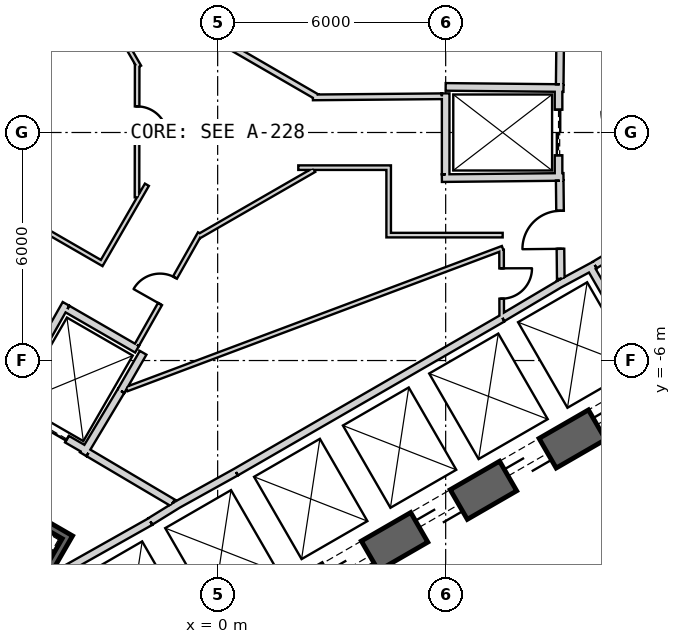
"""IFC4 building model, lengths in metres.
Left out: names, types, materials, properties, quantities, classifications, styles, units other than length and angle.
Written with IfcOpenShell. Run it as: python <this file> out.ifc"""

import sys

from ifc_helpers import new_model, si_unit, direction, frame, frame_2d, origin, place, context, subcontext, project, spatial, rectangle, extrude, element, fill, save


model = new_model("IFC4")
c1 = context("Model", 3, precision=1e-05, world=origin(), true_north=direction((0.0, 1.0)))
c2 = subcontext(c1, "Body", "Model", "MODEL_VIEW")
j1 = project(units=[si_unit("LENGTHUNIT", "METRE"), si_unit("PLANEANGLEUNIT", "RADIAN")], contexts=[c1])
p1 = place(None, origin())
s1 = spatial("IfcSite", under=j1, at=p1, CompositionType="ELEMENT")
p2 = place(p1, origin())
s2 = spatial("IfcBuilding", under=s1, at=p2, CompositionType="ELEMENT")
p3 = place(p2, frame((0.0, 0.0, 253.2)))
s3 = spatial("IfcBuildingStorey", under=s2, at=p3, CompositionType="ELEMENT", Elevation=253.2)
p4 = place(p3, frame((19.475, 2.208, 0.0), z_axis=(0.0, 0.0, 1.0), x_axis=(-0.866028369851, 0.499994862586, 0.0)))
e1 = element("IfcWall", 1, at=p4, inside=s3, PredefinedType="SHEAR", context=c2, shape_type="SweptSolid", body=[
    extrude(rectangle(XDim=31.523, YDim=0.9, at=frame_2d((15.762, 0.0))), origin(), (0.0, 0.0, 1.0), 4.0),
])
p5 = place(p4, frame((7.062, 0.0, 0.0)))
e2 = element("IfcOpeningElement", 2, at=p5, cuts=e1, PredefinedType="OPENING", context=c2, shape_type="SweptSolid", body=[
    extrude(rectangle(XDim=1.2, YDim=2.4, at=frame_2d((0.6, 1.2))), frame((0.0, 0.46, 0.0), z_axis=(0.0, -1.0, 0.0), x_axis=(1.0, 0.0, 0.0)), (0.0, 0.0, 1.0), 0.92),
])
p6 = place(p4, frame((3.612, 0.0, 0.0)))
e3 = element("IfcOpeningElement", 3, at=p6, cuts=e1, PredefinedType="OPENING", context=c2, shape_type="SweptSolid", body=[
    extrude(rectangle(XDim=1.2, YDim=2.4, at=frame_2d((0.6, 1.2))), frame((0.0, 0.46, 0.0), z_axis=(0.0, -1.0, 0.0), x_axis=(1.0, 0.0, 0.0)), (0.0, 0.0, 1.0), 0.92),
])
p7 = place(p4, frame((26.712, 0.0, 0.0)))
e4 = element("IfcOpeningElement", 4, at=p7, cuts=e1, PredefinedType="OPENING", context=c2, shape_type="SweptSolid", body=[
    extrude(rectangle(XDim=1.2, YDim=2.4, at=frame_2d((0.6, 1.2))), frame((0.0, 0.46, 0.0), z_axis=(0.0, -1.0, 0.0), x_axis=(1.0, 0.0, 0.0)), (0.0, 0.0, 1.0), 0.92),
])
p8 = place(p3, frame((-7.825, -17.97, 0.0), z_axis=(0.0, 0.0, 1.0), x_axis=(0.866028369851, 0.499994862586, 0.0)))
e5 = element("IfcWall", 5, at=p8, inside=s3, PredefinedType="SHEAR", context=c2, shape_type="SweptSolid", body=[
    extrude(rectangle(XDim=31.523, YDim=0.9, at=frame_2d((15.762, 0.0))), origin(), (0.0, 0.0, 1.0), 4.0),
])
p9 = place(p8, frame((7.062, 0.0, 0.0)))
e6 = element("IfcOpeningElement", 6, at=p9, cuts=e5, PredefinedType="OPENING", context=c2, shape_type="SweptSolid", body=[
    extrude(rectangle(XDim=1.2, YDim=2.4, at=frame_2d((0.6, 1.2))), frame((0.0, 0.46, 0.0), z_axis=(0.0, -1.0, 0.0), x_axis=(1.0, 0.0, 0.0)), (0.0, 0.0, 1.0), 0.92),
])
p10 = place(p8, frame((9.762, 0.0, 0.0)))
e7 = element("IfcOpeningElement", 7, at=p10, cuts=e5, PredefinedType="OPENING", context=c2, shape_type="SweptSolid", body=[
    extrude(rectangle(XDim=1.2, YDim=2.4, at=frame_2d((0.6, 1.2))), frame((0.0, 0.46, 0.0), z_axis=(0.0, -1.0, 0.0), x_axis=(1.0, 0.0, 0.0)), (0.0, 0.0, 1.0), 0.92),
])
p11 = place(p8, frame((12.462, 0.0, 0.0)))
e8 = element("IfcOpeningElement", 8, at=p11, cuts=e5, PredefinedType="OPENING", context=c2, shape_type="SweptSolid", body=[
    extrude(rectangle(XDim=1.2, YDim=2.4, at=frame_2d((0.6, 1.2))), frame((0.0, 0.46, 0.0), z_axis=(0.0, -1.0, 0.0), x_axis=(1.0, 0.0, 0.0)), (0.0, 0.0, 1.0), 0.92),
])
p12 = place(p8, frame((15.162, 0.0, 0.0)))
e9 = element("IfcOpeningElement", 9, at=p12, cuts=e5, PredefinedType="OPENING", context=c2, shape_type="SweptSolid", body=[
    extrude(rectangle(XDim=1.2, YDim=2.4, at=frame_2d((0.6, 1.2))), frame((0.0, 0.46, 0.0), z_axis=(0.0, -1.0, 0.0), x_axis=(1.0, 0.0, 0.0)), (0.0, 0.0, 1.0), 0.92),
])
p13 = place(p8, frame((17.862, 0.0, 0.0)))
e10 = element("IfcOpeningElement", 10, at=p13, cuts=e5, PredefinedType="OPENING", context=c2, shape_type="SweptSolid", body=[
    extrude(rectangle(XDim=1.2, YDim=2.4, at=frame_2d((0.6, 1.2))), frame((0.0, 0.46, 0.0), z_axis=(0.0, -1.0, 0.0), x_axis=(1.0, 0.0, 0.0)), (0.0, 0.0, 1.0), 0.92),
])
p14 = place(p8, frame((20.562, 0.0, 0.0)))
e11 = element("IfcOpeningElement", 11, at=p14, cuts=e5, PredefinedType="OPENING", context=c2, shape_type="SweptSolid", body=[
    extrude(rectangle(XDim=1.2, YDim=2.4, at=frame_2d((0.6, 1.2))), frame((0.0, 0.46, 0.0), z_axis=(0.0, -1.0, 0.0), x_axis=(1.0, 0.0, 0.0)), (0.0, 0.0, 1.0), 0.92),
])
p15 = place(p8, frame((26.712, 0.0, 0.0)))
e12 = element("IfcOpeningElement", 12, at=p15, cuts=e5, PredefinedType="OPENING", context=c2, shape_type="SweptSolid", body=[
    extrude(rectangle(XDim=1.2, YDim=2.4, at=frame_2d((0.6, 1.2))), frame((0.0, 0.46, 0.0), z_axis=(0.0, -1.0, 0.0), x_axis=(1.0, 0.0, 0.0)), (0.0, 0.0, 1.0), 0.92),
])
p16 = place(p8, frame((3.612, 0.0, 0.0)))
e13 = element("IfcOpeningElement", 13, at=p16, cuts=e5, PredefinedType="OPENING", context=c2, shape_type="SweptSolid", body=[
    extrude(rectangle(XDim=1.2, YDim=2.4, at=frame_2d((0.6, 1.2))), frame((0.0, 0.46, 0.0), z_axis=(0.0, -1.0, 0.0), x_axis=(1.0, 0.0, 0.0)), (0.0, 0.0, 1.0), 0.92),
])
p17 = place(p3, frame((0.483, -8.936, 0.0), z_axis=(0.0, 0.0, 1.0), x_axis=(0.866030989016, 0.499990325971, 0.0)))
e14 = element("IfcWall", 14, at=p17, inside=s3, PredefinedType="PLUMBINGWALL", context=c2, shape_type="SweptSolid", body=[
    extrude(rectangle(XDim=8.1, YDim=0.2, at=frame_2d((4.05, 0.0))), origin(), (0.0, 0.0, 1.0), 3.7),
])
p18 = place(p3, frame((9.795, -3.525, 0.0), z_axis=(0.0, 0.0, 1.0), x_axis=(0.499984717929, -0.866034226713, 0.0)))
e15 = element("IfcWall", 15, at=p18, inside=s3, PredefinedType="PLUMBINGWALL", context=c2, shape_type="SweptSolid", body=[
    extrude(rectangle(XDim=3.25, YDim=0.2, at=frame_2d((1.625, 0.0))), origin(), (0.0, 0.0, 1.0), 3.7),
])
p19 = place(p3, frame((8.974, -3.999, 0.0), z_axis=(0.0, 0.0, 1.0), x_axis=(0.880907015104, 0.473289373154, 0.0)))
e16 = element("IfcWall", 16, at=p19, inside=s3, PredefinedType="PLUMBINGWALL", context=c2, shape_type="SweptSolid", body=[
    extrude(rectangle(XDim=1.078, YDim=0.2, at=frame_2d((0.539, 0.0))), origin(), (0.0, 0.0, 1.0), 3.7),
])
p20 = place(p3, frame((7.493, -4.878, 0.0), z_axis=(0.0, 0.0, 1.0), x_axis=(0.859981807212, 0.510324691999, 0.0)))
e17 = element("IfcWall", 17, at=p20, inside=s3, PredefinedType="PLUMBINGWALL", context=c2, shape_type="SweptSolid", body=[
    extrude(rectangle(XDim=1.845, YDim=0.2, at=frame_2d((0.922, 0.0))), origin(), (0.0, 0.0, 1.0), 3.7),
])
p21 = place(p3, frame((-1.769, -10.237, 0.0), z_axis=(0.0, 0.0, 1.0), x_axis=(-0.871534483978, -0.490334215854, 0.0)))
e18 = element("IfcWall", 18, at=p21, inside=s3, PredefinedType="PLUMBINGWALL", context=c2, shape_type="SweptSolid", body=[
    extrude(rectangle(XDim=2.7, YDim=0.2, at=frame_2d((1.35, 0.0))), origin(), (0.0, 0.0, 1.0), 3.7),
])
p22 = place(p3, frame((-1.024, -9.771, 0.0), z_axis=(0.0, 0.0, 1.0), x_axis=(-0.850348075135, -0.526220629693, 0.0)))
e19 = element("IfcWall", 19, at=p22, inside=s3, PredefinedType="PLUMBINGWALL", context=c2, shape_type="SweptSolid", body=[
    extrude(rectangle(XDim=0.878, YDim=0.2, at=frame_2d((0.439, 0.0))), origin(), (0.0, 0.0, 1.0), 3.7),
])
p23 = place(p3, frame((-1.13, -9.831, 0.0), z_axis=(0.0, 0.0, 1.0), x_axis=(0.874269620932, 0.485440655401, 0.0)))
e20 = element("IfcWall", 20, at=p23, inside=s3, PredefinedType="PLUMBINGWALL", context=c2, shape_type="SweptSolid", body=[
    extrude(rectangle(XDim=1.845, YDim=0.2, at=frame_2d((0.922, 0.0))), origin(), (0.0, 0.0, 1.0), 3.7),
])
p24 = place(p3, frame((8.97, 1.2, 0.0), z_axis=(0.0, 0.0, 1.0), x_axis=(0.0, -1.0, 0.0)))
e21 = element("IfcWall", 21, at=p24, inside=s3, PredefinedType="PLUMBINGWALL", context=c2, shape_type="SweptSolid", body=[
    extrude(rectangle(XDim=2.4, YDim=0.2, at=frame_2d((1.2, 0.0))), origin(), (0.0, 0.0, 1.0), 3.7),
])
p25 = place(p24, frame((0.6, 0.0, 0.0)))
e22 = element("IfcOpeningElement", 22, at=p25, cuts=e21, PredefinedType="OPENING", context=c2, shape_type="SweptSolid", body=[
    extrude(rectangle(XDim=1.2, YDim=2.4, at=frame_2d((0.6, 1.2))), frame((0.0, 0.11, 0.0), z_axis=(0.0, -1.0, 0.0), x_axis=(1.0, 0.0, 0.0)), (0.0, 0.0, 1.0), 0.22),
])
p26 = place(p3, frame((6.0, 1.2, 0.0), z_axis=(0.0, 0.0, 1.0), x_axis=(0.999949988, -0.010001074852, 0.0)))
e23 = element("IfcWall", 23, at=p26, inside=s3, PredefinedType="PLUMBINGWALL", context=c2, shape_type="SweptSolid", body=[
    extrude(rectangle(XDim=3.1, YDim=0.2, at=frame_2d((1.55, 0.0))), origin(), (0.0, 0.0, 1.0), 3.7),
])
p27 = place(p3, frame((5.9, -1.201, 0.0), z_axis=(0.0, 0.0, 1.0), x_axis=(0.999950064753, 0.009993397809, 0.0)))
e24 = element("IfcWall", 24, at=p27, inside=s3, PredefinedType="PLUMBINGWALL", context=c2, shape_type="SweptSolid", body=[
    extrude(rectangle(XDim=3.2, YDim=0.2, at=frame_2d((1.6, 0.0))), origin(), (0.0, 0.0, 1.0), 3.7),
])
p28 = place(p3, frame((6.0, -1.1, 0.0), z_axis=(0.0, 0.0, 1.0), x_axis=(0.0, 1.0, 0.0)))
e25 = element("IfcWall", 25, at=p28, inside=s3, PredefinedType="PLUMBINGWALL", context=c2, shape_type="SweptSolid", body=[
    extrude(rectangle(XDim=2.13, YDim=0.2, at=frame_2d((1.065, 0.0))), origin(), (0.0, 0.0, 1.0), 3.7),
])
p29 = place(p3, frame((-3.905, -10.563, -0.3), z_axis=(0.0, 0.0, 1.0), x_axis=(-0.500012932018, -0.866017937352, 0.0)))
e26 = element("IfcWall", 26, at=p29, inside=s3, PredefinedType="SHEAR", context=c2, shape_type="SweptSolid", body=[
    extrude(rectangle(XDim=8.1, YDim=0.2, at=frame_2d((4.05, 0.0))), origin(), (0.0, 0.0, 1.0), 4.0),
])
p30 = place(p3, frame((-4.041, -10.599, -0.3), z_axis=(0.0, 0.0, 1.0), x_axis=(-0.866047807691, 0.499961193289, 0.0)))
e27 = element("IfcWall", 27, at=p30, inside=s3, PredefinedType="SHEAR", context=c2, shape_type="SweptSolid", body=[
    extrude(rectangle(XDim=3.6, YDim=0.2, at=frame_2d((1.8, 0.0))), origin(), (0.0, 0.0, 1.0), 4.0),
])
p31 = place(p30, frame((1.25, 0.0, 0.3)))
e28 = element("IfcOpeningElement", 28, at=p31, cuts=e27, PredefinedType="OPENING", context=c2, shape_type="SweptSolid", body=[
    extrude(rectangle(XDim=1.1, YDim=2.1, at=frame_2d((0.55, 1.05))), frame((0.0, 0.11, 0.0), z_axis=(0.0, -1.0, 0.0), x_axis=(1.0, 0.0, 0.0)), (0.0, 0.0, 1.0), 0.22),
])
p32 = place(p3, frame((-3.446, -8.368, 0.0), z_axis=(0.0, 0.0, 1.0), x_axis=(-0.866024647952, 0.500001309137, 0.0)))
e29 = element("IfcWall", 29, at=p32, inside=s3, PredefinedType="PLUMBINGWALL", context=c2, shape_type="SweptSolid", body=[
    extrude(rectangle(XDim=2.4, YDim=0.2, at=frame_2d((1.2, 0.0))), origin(), (0.0, 0.0, 1.0), 3.7),
])
p33 = place(p32, frame((0.6, 0.0, 0.0)))
e30 = element("IfcOpeningElement", 30, at=p33, cuts=e29, PredefinedType="OPENING", context=c2, shape_type="SweptSolid", body=[
    extrude(rectangle(XDim=1.2, YDim=2.4, at=frame_2d((0.6, 1.2))), frame((0.0, 0.11, 0.0), z_axis=(0.0, -1.0, 0.0), x_axis=(1.0, 0.0, 0.0)), (0.0, 0.0, 1.0), 0.22),
])
p34 = place(p3, frame((-1.961, -5.796, 0.0), z_axis=(0.0, 0.0, 1.0), x_axis=(-0.500074377092, -0.865982457891, 0.0)))
e31 = element("IfcWall", 31, at=p34, inside=s3, PredefinedType="PLUMBINGWALL", context=c2, shape_type="SweptSolid", body=[
    extrude(rectangle(XDim=1.161, YDim=0.2, at=frame_2d((0.581, 0.0))), origin(), (0.0, 0.0, 1.0), 3.7),
])
p35 = place(p3, frame((-2.542, -6.801, 0.0), z_axis=(0.0, 0.0, 1.0), x_axis=(-0.51375503712, -0.857936921827, 0.0)))
e32 = element("IfcWall", 32, at=p35, inside=s3, PredefinedType="PLUMBINGWALL", context=c2, shape_type="SweptSolid", body=[
    extrude(rectangle(XDim=1.939, YDim=0.2, at=frame_2d((0.97, 0.0))), origin(), (0.0, 0.0, 1.0), 3.7),
])
p36 = place(p3, frame((-3.99, -4.509, 0.0), z_axis=(0.0, 0.0, 1.0), x_axis=(-0.491358283181, -0.870957540612, 0.0)))
e33 = element("IfcWall", 33, at=p36, inside=s3, PredefinedType="PLUMBINGWALL", context=c2, shape_type="SweptSolid", body=[
    extrude(rectangle(XDim=3.2, YDim=0.2, at=frame_2d((1.6, 0.0))), origin(), (0.0, 0.0, 1.0), 3.7),
])
p37 = place(p3, frame((-3.953, -4.646, 0.0), z_axis=(0.0, 0.0, 1.0), x_axis=(0.866060616833, -0.499939004251, 0.0)))
e34 = element("IfcWall", 34, at=p37, inside=s3, PredefinedType="PLUMBINGWALL", context=c2, shape_type="SweptSolid", body=[
    extrude(rectangle(XDim=2.115, YDim=0.2, at=frame_2d((1.057, 0.0))), origin(), (0.0, 0.0, 1.0), 3.7),
])
p38 = place(p3, frame((12.245, -2.109, 0.0), z_axis=(0.0, 0.0, 1.0), x_axis=(-0.860414880418, -0.509594185166, 0.0)))
e35 = element("IfcWall", 35, at=p38, inside=s3, PredefinedType="PARTITIONING", context=c2, shape_type="SweptSolid", body=[
    extrude(rectangle(XDim=2.7, YDim=0.2, at=frame_2d((1.35, 0.0))), origin(), (0.0, 0.0, 1.0), 3.7),
])
p39 = place(p3, frame((9.001, 1.27, 0.0), z_axis=(0.0, 0.0, 1.0), x_axis=(0.01074821465, 0.999942236273, 0.0)))
e36 = element("IfcWall", 36, at=p39, inside=s3, PredefinedType="PARTITIONING", context=c2, shape_type="SweptSolid", body=[
    extrude(rectangle(XDim=2.726, YDim=0.2, at=frame_2d((1.363, 0.0))), origin(), (0.0, 0.0, 1.0), 3.7),
])
p40 = place(p3, frame((9.029, -3.851, 0.0), z_axis=(0.0, 0.0, 1.0), x_axis=(-0.010783593937, 0.99994185536, 0.0)))
e37 = element("IfcWall", 37, at=p40, inside=s3, PredefinedType="PARTITIONING", context=c2, shape_type="SweptSolid", body=[
    extrude(rectangle(XDim=2.581, YDim=0.2, at=frame_2d((1.291, 0.0))), origin(), (0.0, 0.0, 1.0), 3.7),
])
p41 = place(p40, frame((0.791, 0.0, 0.0)))
e38 = element("IfcOpeningElement", 38, at=p41, cuts=e37, PredefinedType="OPENING", context=c2, shape_type="SweptSolid", body=[
    extrude(rectangle(XDim=1.0, YDim=2.1, at=frame_2d((0.5, 1.05))), frame((0.0, 0.11, 0.0), z_axis=(0.0, -1.0, 0.0), x_axis=(1.0, 0.0, 0.0)), (0.0, 0.0, 1.0), 0.22),
])
p42 = place(p3, frame((-3.401, -8.43, 0.0), z_axis=(0.0, 0.0, 1.0), x_axis=(0.860615607571, -0.509255118781, 0.0)))
e39 = element("IfcWall", 39, at=p42, inside=s3, PredefinedType="PARTITIONING", context=c2, shape_type="SweptSolid", body=[
    extrude(rectangle(XDim=2.581, YDim=0.2, at=frame_2d((1.29, 0.0))), origin(), (0.0, 0.0, 1.0), 3.7),
])
p43 = place(p3, frame((2.507, 0.924, 0.0), z_axis=(0.0, 0.0, 1.0), x_axis=(0.999961473465, 0.008777903278, 0.0)))
e40 = element("IfcWall", 40, at=p43, inside=s3, PredefinedType="PLUMBINGWALL", context=c2, shape_type="SweptSolid", body=[
    extrude(rectangle(XDim=3.393, YDim=0.15, at=frame_2d((1.697, 0.0))), origin(), (0.0, 0.0, 1.0), 3.7),
])
p44 = place(p3, frame((-0.385, 2.673, 0.0), z_axis=(0.0, 0.0, 1.0), x_axis=(0.865415028875, -0.501055713266, 0.0)))
e41 = element("IfcWall", 41, at=p44, inside=s3, PredefinedType="PLUMBINGWALL", context=c2, shape_type="SweptSolid", body=[
    extrude(rectangle(XDim=3.465, YDim=0.15, at=frame_2d((1.732, 0.0))), origin(), (0.0, 0.0, 1.0), 3.7),
])
p45 = place(p3, frame((7.5, -3.042, 0.0), z_axis=(0.0, 0.0, 1.0), x_axis=(-0.936345316301, -0.35108040196, 0.0)))
e42 = element("IfcWall", 42, at=p45, inside=s3, PredefinedType="PARTITIONING", context=c2, shape_type="SweptSolid", body=[
    extrude(rectangle(XDim=10.568, YDim=0.12, at=frame_2d((5.284, 0.0))), origin(), (0.0, 0.0, 1.0), 3.7),
])
p46 = place(p3, frame((-0.466, -2.655, 0.0), z_axis=(0.0, 0.0, 1.0), x_axis=(-0.49235580986, -0.870394023703, 0.0)))
e43 = element("IfcWall", 43, at=p46, inside=s3, PredefinedType="PARTITIONING", context=c2, shape_type="SweptSolid", body=[
    extrude(rectangle(XDim=3.368, YDim=0.12, at=frame_2d((1.684, 0.0))), origin(), (0.0, 0.0, 1.0), 3.7),
])
p47 = place(p46, frame((1.335, 0.0, 0.0)))
e44 = element("IfcOpeningElement", 44, at=p47, cuts=e43, PredefinedType="OPENING", context=c2, shape_type="SweptSolid", body=[
    extrude(rectangle(XDim=0.8, YDim=2.1, at=frame_2d((0.4, 1.05))), frame((0.0, 0.07, 0.0), z_axis=(0.0, -1.0, 0.0), x_axis=(1.0, 0.0, 0.0)), (0.0, 0.0, 1.0), 0.14),
])
p48 = place(p3, frame((2.539, -0.985, 0.0), z_axis=(0.0, 0.0, 1.0), x_axis=(-0.866657135765, -0.498904208268, 0.0)))
e45 = element("IfcWall", 45, at=p48, inside=s3, PredefinedType="PARTITIONING", context=c2, shape_type="SweptSolid", body=[
    extrude(rectangle(XDim=3.505, YDim=0.12, at=frame_2d((1.752, 0.0))), origin(), (0.0, 0.0, 1.0), 3.7),
])
p49 = place(p3, frame((4.56, -0.925, 0.0), z_axis=(0.0, 0.0, 1.0), x_axis=(-1.0, 0.0, 0.0)))
e46 = element("IfcWall", 46, at=p49, inside=s3, PredefinedType="PARTITIONING", context=c2, shape_type="SweptSolid", body=[
    extrude(rectangle(XDim=2.438, YDim=0.12, at=frame_2d((1.219, 0.0))), origin(), (0.0, 0.0, 1.0), 3.7),
])
p50 = place(p3, frame((4.5, -2.76, 0.0), z_axis=(0.0, 0.0, 1.0), x_axis=(0.0, 1.0, 0.0)))
e47 = element("IfcWall", 47, at=p50, inside=s3, PredefinedType="PARTITIONING", context=c2, shape_type="SweptSolid", body=[
    extrude(rectangle(XDim=1.775, YDim=0.12, at=frame_2d((0.887, 0.0))), origin(), (0.0, 0.0, 1.0), 3.7),
])
p51 = place(p3, frame((7.5, -2.7, 0.0), z_axis=(0.0, 0.0, 1.0), x_axis=(-1.0, 0.0, 0.0)))
e48 = element("IfcWall", 48, at=p51, inside=s3, PredefinedType="PARTITIONING", context=c2, shape_type="SweptSolid", body=[
    extrude(rectangle(XDim=2.94, YDim=0.12, at=frame_2d((1.47, 0.0))), origin(), (0.0, 0.0, 1.0), 3.7),
])
p52 = place(p3, frame((7.475, -4.865, 0.0), z_axis=(0.0, 0.0, 1.0), x_axis=(-0.002330037535, 0.999997285459, 0.0)))
e49 = element("IfcWall", 49, at=p52, inside=s3, PredefinedType="PARTITIONING", context=c2, shape_type="SweptSolid", body=[
    extrude(rectangle(XDim=1.781, YDim=0.12, at=frame_2d((0.891, 0.0))), origin(), (0.0, 0.0, 1.0), 3.7),
])
p53 = place(p52, frame((0.49, 0.0, 0.0)))
e50 = element("IfcOpeningElement", 50, at=p53, cuts=e49, PredefinedType="OPENING", context=c2, shape_type="SweptSolid", body=[
    extrude(rectangle(XDim=0.8, YDim=2.1, at=frame_2d((0.4, 1.05))), frame((0.0, 0.07, 0.0), z_axis=(0.0, -1.0, 0.0), x_axis=(1.0, 0.0, 0.0)), (0.0, 0.0, 1.0), 0.14),
])
p54 = place(p3, frame((-2.066, 1.729, 0.0), z_axis=(0.0, 0.0, 1.0), x_axis=(-0.500002807145, 0.866023783073, 0.0)))
e51 = element("IfcWall", 51, at=p54, inside=s3, PredefinedType="PARTITIONING", context=c2, shape_type="SweptSolid", body=[
    extrude(rectangle(XDim=1.91, YDim=0.12, at=frame_2d((0.955, 0.0))), origin(), (0.0, 0.0, 1.0), 3.7),
])
p55 = place(p3, frame((-2.122, -1.706, 0.0), z_axis=(0.0, 0.0, 1.0), x_axis=(0.001253480909, 0.999999214392, 0.0)))
e52 = element("IfcWall", 52, at=p55, inside=s3, PredefinedType="PARTITIONING", context=c2, shape_type="SweptSolid", body=[
    extrude(rectangle(XDim=3.506, YDim=0.12, at=frame_2d((1.753, 0.0))), origin(), (0.0, 0.0, 1.0), 3.7),
])
p56 = place(p55, frame((1.594, 0.0, 0.0)))
e53 = element("IfcOpeningElement", 53, at=p56, cuts=e52, PredefinedType="OPENING", context=c2, shape_type="SweptSolid", body=[
    extrude(rectangle(XDim=0.8, YDim=2.1, at=frame_2d((0.4, 1.05))), frame((0.0, 0.07, 0.0), z_axis=(0.0, -1.0, 0.0), x_axis=(1.0, 0.0, 0.0)), (0.0, 0.0, 1.0), 0.14),
])
p57 = place(p3, frame((-3.081, -3.487, 0.0), z_axis=(0.0, 0.0, 1.0), x_axis=(0.499962263673, 0.866047189767, 0.0)))
e54 = element("IfcWall", 54, at=p57, inside=s3, PredefinedType="PARTITIONING", context=c2, shape_type="SweptSolid", body=[
    extrude(rectangle(XDim=2.438, YDim=0.12, at=frame_2d((1.219, 0.0))), origin(), (0.0, 0.0, 1.0), 3.7),
])
p58 = place(p3, frame((-4.64, -2.517, 0.0), z_axis=(0.0, 0.0, 1.0), x_axis=(0.866025242659, -0.500000279077, 0.0)))
e55 = element("IfcWall", 55, at=p58, inside=s3, PredefinedType="PARTITIONING", context=c2, shape_type="SweptSolid", body=[
    extrude(rectangle(XDim=1.775, YDim=0.12, at=frame_2d((0.887, 0.0))), origin(), (0.0, 0.0, 1.0), 3.7),
])
p59 = place(p3, frame((6.275, -14.968, 0.0), z_axis=(0.0, 0.0, 1.0), x_axis=(0.866025615516, 0.499999633269, 0.0)))
e56 = element("IfcWall", 56, at=p59, inside=s3, PredefinedType="PARTITIONING", context=c2, shape_type="SweptSolid", body=[
    extrude(rectangle(XDim=12.834, YDim=0.2, at=frame_2d((6.417, 0.0))), origin(), (0.0, 0.0, 1.0), 2.98),
])
p60 = place(p41, origin())
e57 = element("IfcDoor", 57, at=p60, inside=s3, OperationType="SINGLE_SWING_RIGHT", PredefinedType="USERDEFINED", context=c2, shape_type="SweptSolid", body=[
    extrude(rectangle(XDim=1.0, YDim=2.1, at=frame_2d((0.5, 1.05))), frame((0.0, 0.025, 0.0), z_axis=(0.0, -1.0, 0.0), x_axis=(1.0, 0.0, 0.0)), (0.0, 0.0, 1.0), 0.05),
])
fill(e38, e57)
p61 = place(p25, origin())
e58 = element("IfcDoor", 58, at=p61, inside=s3, OperationType="SLIDING_TO_LEFT", PredefinedType="USERDEFINED", context=c2, shape_type="SweptSolid", body=[
    extrude(rectangle(XDim=1.2, YDim=2.4, at=frame_2d((0.6, 1.2))), frame((0.0, 0.025, 0.0), z_axis=(0.0, -1.0, 0.0), x_axis=(1.0, 0.0, 0.0)), (0.0, 0.0, 1.0), 0.05),
])
fill(e22, e58)
p62 = place(p33, origin())
e59 = element("IfcDoor", 59, at=p62, inside=s3, OperationType="SLIDING_TO_LEFT", PredefinedType="USERDEFINED", context=c2, shape_type="SweptSolid", body=[
    extrude(rectangle(XDim=1.2, YDim=2.4, at=frame_2d((0.6, 1.2))), frame((0.0, 0.025, 0.0), z_axis=(0.0, -1.0, 0.0), x_axis=(1.0, 0.0, 0.0)), (0.0, 0.0, 1.0), 0.05),
])
fill(e30, e59)
p63 = place(p47, origin())
e60 = element("IfcDoor", 60, at=p63, inside=s3, OperationType="SINGLE_SWING_RIGHT", PredefinedType="USERDEFINED", context=c2, shape_type="SweptSolid", body=[
    extrude(rectangle(XDim=0.8, YDim=2.1, at=frame_2d((0.4, 1.05))), frame((0.0, 0.025, 0.0), z_axis=(0.0, -1.0, 0.0), x_axis=(1.0, 0.0, 0.0)), (0.0, 0.0, 1.0), 0.05),
])
fill(e44, e60)
p64 = place(p53, origin())
e61 = element("IfcDoor", 61, at=p64, inside=s3, OperationType="SINGLE_SWING_LEFT", PredefinedType="USERDEFINED", context=c2, shape_type="SweptSolid", body=[
    extrude(rectangle(XDim=0.8, YDim=2.1, at=frame_2d((0.4, 1.05))), frame((0.0, 0.025, 0.0), z_axis=(0.0, -1.0, 0.0), x_axis=(1.0, 0.0, 0.0)), (0.0, 0.0, 1.0), 0.05),
])
fill(e50, e61)
p65 = place(p56, origin())
e62 = element("IfcDoor", 62, at=p65, inside=s3, OperationType="SINGLE_SWING_RIGHT", PredefinedType="USERDEFINED", context=c2, shape_type="SweptSolid", body=[
    extrude(rectangle(XDim=0.8, YDim=2.1, at=frame_2d((0.4, 1.05))), frame((0.0, 0.025, 0.0), z_axis=(0.0, -1.0, 0.0), x_axis=(1.0, 0.0, 0.0)), (0.0, 0.0, 1.0), 0.05),
])
fill(e53, e62)
p66 = place(p11, origin())
e63 = element("IfcDoor", 63, at=p66, inside=s3, OperationType="SLIDING_TO_LEFT", PredefinedType="USERDEFINED", context=c2, shape_type="SweptSolid", body=[
    extrude(rectangle(XDim=1.2, YDim=2.4, at=frame_2d((0.6, 1.2))), frame((0.0, 0.025, 0.0), z_axis=(0.0, -1.0, 0.0), x_axis=(1.0, 0.0, 0.0)), (0.0, 0.0, 1.0), 0.05),
])
fill(e8, e63)
p67 = place(p12, origin())
e64 = element("IfcDoor", 64, at=p67, inside=s3, OperationType="SLIDING_TO_LEFT", PredefinedType="USERDEFINED", context=c2, shape_type="SweptSolid", body=[
    extrude(rectangle(XDim=1.2, YDim=2.4, at=frame_2d((0.6, 1.2))), frame((0.0, 0.025, 0.0), z_axis=(0.0, -1.0, 0.0), x_axis=(1.0, 0.0, 0.0)), (0.0, 0.0, 1.0), 0.05),
])
fill(e9, e64)
p68 = place(p13, origin())
e65 = element("IfcDoor", 65, at=p68, inside=s3, OperationType="SLIDING_TO_LEFT", PredefinedType="USERDEFINED", context=c2, shape_type="SweptSolid", body=[
    extrude(rectangle(XDim=1.2, YDim=2.4, at=frame_2d((0.6, 1.2))), frame((0.0, 0.025, 0.0), z_axis=(0.0, -1.0, 0.0), x_axis=(1.0, 0.0, 0.0)), (0.0, 0.0, 1.0), 0.05),
])
fill(e10, e65)
p69 = place(p14, origin())
e66 = element("IfcDoor", 66, at=p69, inside=s3, OperationType="SLIDING_TO_LEFT", PredefinedType="USERDEFINED", context=c2, shape_type="SweptSolid", body=[
    extrude(rectangle(XDim=1.2, YDim=2.4, at=frame_2d((0.6, 1.2))), frame((0.0, 0.025, 0.0), z_axis=(0.0, -1.0, 0.0), x_axis=(1.0, 0.0, 0.0)), (0.0, 0.0, 1.0), 0.05),
])
fill(e11, e66)
save(model, sys.argv[1])
